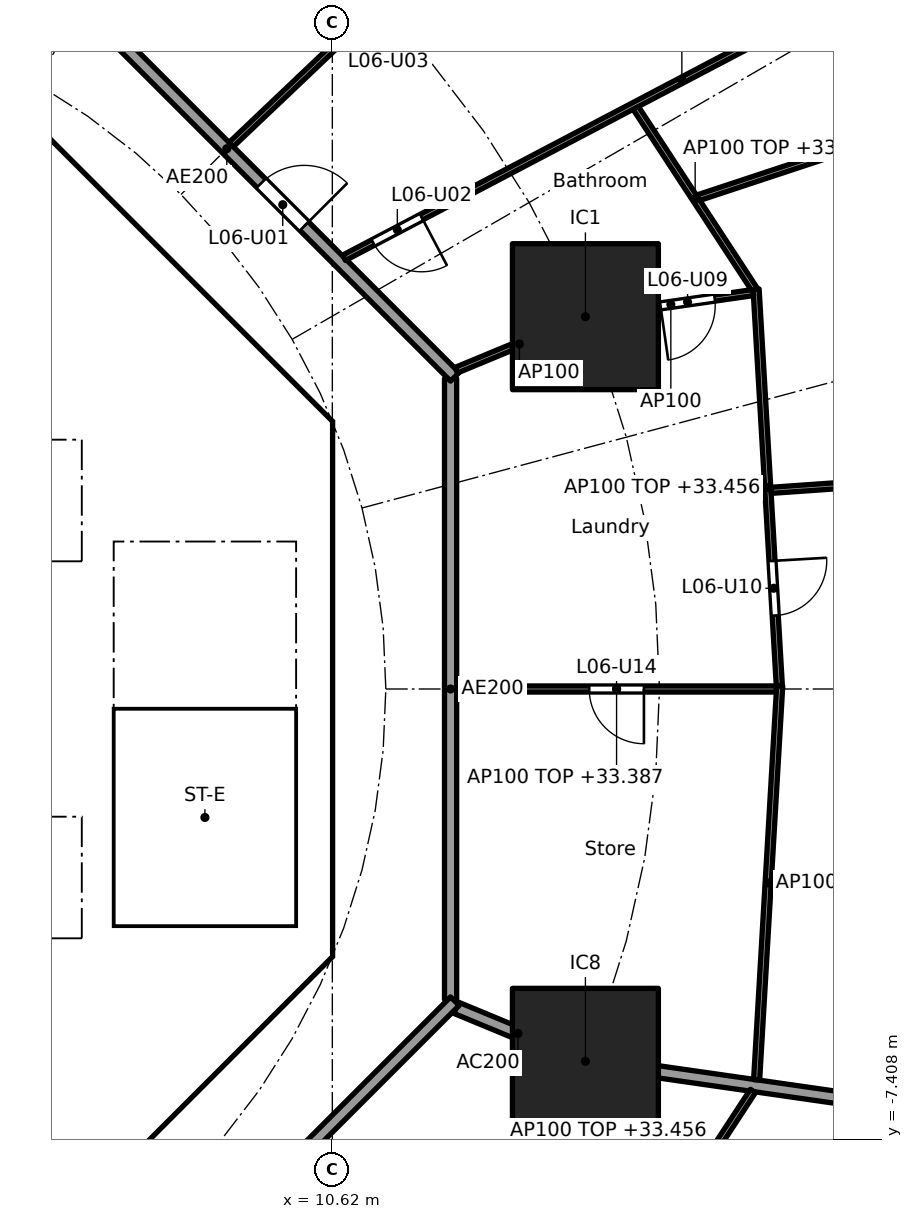
"""IFC4 building model, lengths in metres.
Left out: names, types, materials, properties, quantities, classifications, styles, units other than length and angle.
Written with IfcOpenShell. Run it as: python <this file> out.ifc"""

import sys

from ifc_helpers import new_model, si_unit, direction, frame, frame_2d, origin, origin_2d, place, context, subcontext, project, spatial, polyline, rectangle, outline, extrude, element, fill, save


model = new_model("IFC4")
c1 = context("Model", 3, precision=1e-05, world=origin(), true_north=direction((0.0, 1.0)))
c2 = subcontext(c1, "Body", "Model", "MODEL_VIEW")
j1 = project(units=[si_unit("LENGTHUNIT", "METRE"), si_unit("PLANEANGLEUNIT", "RADIAN")], contexts=[c1])
p1 = place(None, origin())
s1 = spatial("IfcSite", under=j1, at=p1, CompositionType="ELEMENT")
p2 = place(p1, origin())
s2 = spatial("IfcBuilding", under=s1, at=p2, CompositionType="ELEMENT")
p3 = place(p2, frame((0.0, 0.0, 30.7)))
s3 = spatial("IfcBuildingStorey", under=s2, at=p3, CompositionType="ELEMENT", Elevation=30.7)
for number, where, z_axis, x_axis in (
    (1, (14.782, 6.123, 0.0), (0.0, 0.0, 1.0), (1.0, 0.0, 0.0)),
    (2, (14.782, -6.123, 0.0), (0.0, 0.0, 1.0), (1.0, 0.0, 0.0)),
):
    element("IfcColumn", number, at=place(p3, frame(where, z_axis=z_axis, x_axis=x_axis)), inside=s3, PredefinedType="COLUMN", context=c2, shape_type="SweptSolid", body=[
        extrude(rectangle(XDim=2.4, YDim=2.4, at=origin_2d()), origin(), (0.0, 0.0, 1.0), 3.7),
    ])
p4 = place(p3, frame((9.988, 4.613, 0.0), z_axis=(0.0, 0.0, 1.0), x_axis=(-0.707106781187, 0.707106781187, 0.0)))
e3 = element("IfcWall", 3, at=p4, inside=s3, PredefinedType="SHEAR", context=c2, shape_type="SweptSolid", body=[
    extrude(rectangle(XDim=7.602, YDim=0.6, at=frame_2d((3.801, 0.0))), origin(), (0.0, 0.0, 1.0), 3.44),
])
p5 = place(p4, frame((3.201, 0.0, 0.0)))
e4 = element("IfcOpeningElement", 4, at=p5, cuts=e3, PredefinedType="OPENING", context=c2, shape_type="SweptSolid", body=[
    extrude(rectangle(XDim=1.2, YDim=2.1, at=frame_2d((0.6, 1.05))), frame((0.0, 0.31, 0.0), z_axis=(0.0, -1.0, 0.0), x_axis=(1.0, 0.0, 0.0)), (0.0, 0.0, 1.0), 0.62),
])
p6 = place(p3, frame((4.613, -9.988, 0.0), z_axis=(0.0, 0.0, 1.0), x_axis=(0.707106781187, 0.707106781187, 0.0)))
e5 = element("IfcWall", 5, at=p6, inside=s3, PredefinedType="SHEAR", context=c2, shape_type="SweptSolid", body=[
    extrude(rectangle(XDim=7.602, YDim=0.6, at=frame_2d((3.801, 0.0))), origin(), (0.0, 0.0, 1.0), 3.44),
])
p7 = place(p6, frame((3.201, 0.0, 0.0)))
e6 = element("IfcOpeningElement", 6, at=p7, cuts=e5, PredefinedType="OPENING", context=c2, shape_type="SweptSolid", body=[
    extrude(rectangle(XDim=1.2, YDim=2.1, at=frame_2d((0.6, 1.05))), frame((0.0, 0.31, 0.0), z_axis=(0.0, -1.0, 0.0), x_axis=(1.0, 0.0, 0.0)), (0.0, 0.0, 1.0), 0.62),
])
p8 = place(p3, frame((-6.7, 2.0, 0.0), z_axis=(0.0, 0.0, 1.0), x_axis=(1.0, 0.0, 0.0)))
e7 = element("IfcWall", 7, at=p8, inside=s3, PredefinedType="SOLIDWALL", context=c2, shape_type="SweptSolid", body=[
    extrude(rectangle(XDim=13.4, YDim=0.2, at=frame_2d((6.7, 0.0))), origin(), (0.0, 0.0, 1.0), 3.44),
])
p9 = place(p8, frame((0.65, 0.0, 0.0)))
e8 = element("IfcOpeningElement", 8, at=p9, cuts=e7, PredefinedType="OPENING", context=c2, shape_type="SweptSolid", body=[
    extrude(rectangle(XDim=1.1, YDim=2.1, at=frame_2d((0.55, 1.05))), frame((0.0, 0.11, 0.0), z_axis=(0.0, -1.0, 0.0), x_axis=(1.0, 0.0, 0.0)), (0.0, 0.0, 1.0), 0.22),
])
p10 = place(p8, frame((2.85, 0.0, 0.0)))
e9 = element("IfcOpeningElement", 9, at=p10, cuts=e7, PredefinedType="OPENING", context=c2, shape_type="SweptSolid", body=[
    extrude(rectangle(XDim=1.1, YDim=2.1, at=frame_2d((0.55, 1.05))), frame((0.0, 0.11, 0.0), z_axis=(0.0, -1.0, 0.0), x_axis=(1.0, 0.0, 0.0)), (0.0, 0.0, 1.0), 0.22),
])
p11 = place(p8, frame((5.05, 0.0, 0.0)))
e10 = element("IfcOpeningElement", 10, at=p11, cuts=e7, PredefinedType="OPENING", context=c2, shape_type="SweptSolid", body=[
    extrude(rectangle(XDim=1.1, YDim=2.1, at=frame_2d((0.55, 1.05))), frame((0.0, 0.11, 0.0), z_axis=(0.0, -1.0, 0.0), x_axis=(1.0, 0.0, 0.0)), (0.0, 0.0, 1.0), 0.22),
])
p12 = place(p3, frame((6.7, 4.0, 0.0), z_axis=(0.0, 0.0, 1.0), x_axis=(1.0, 0.0, 0.0)))
e11 = element("IfcWall", 11, at=p12, inside=s3, PredefinedType="SOLIDWALL", context=c2, shape_type="SweptSolid", body=[
    extrude(rectangle(XDim=3.325, YDim=0.2, at=frame_2d((1.662, 0.0))), origin(), (0.0, 0.0, 1.0), 3.44),
])
p13 = place(p12, frame((1.25, 0.0, 0.0)))
e12 = element("IfcOpeningElement", 12, at=p13, cuts=e11, PredefinedType="OPENING", context=c2, shape_type="SweptSolid", body=[
    extrude(rectangle(XDim=1.1, YDim=2.1, at=frame_2d((0.55, 1.05))), frame((0.0, 0.11, 0.0), z_axis=(0.0, -1.0, 0.0), x_axis=(1.0, 0.0, 0.0)), (0.0, 0.0, 1.0), 0.22),
])
p14 = place(p3, frame((-6.7, -2.0, 0.0), z_axis=(0.0, 0.0, 1.0), x_axis=(1.0, 0.0, 0.0)))
e13 = element("IfcWall", 13, at=p14, inside=s3, PredefinedType="SOLIDWALL", context=c2, shape_type="SweptSolid", body=[
    extrude(rectangle(XDim=13.4, YDim=0.2, at=frame_2d((6.7, 0.0))), origin(), (0.0, 0.0, 1.0), 3.44),
])
p15 = place(p14, frame((0.65, 0.0, 0.0)))
e14 = element("IfcOpeningElement", 14, at=p15, cuts=e13, PredefinedType="OPENING", context=c2, shape_type="SweptSolid", body=[
    extrude(rectangle(XDim=1.1, YDim=2.1, at=frame_2d((0.55, 1.05))), frame((0.0, 0.11, 0.0), z_axis=(0.0, -1.0, 0.0), x_axis=(1.0, 0.0, 0.0)), (0.0, 0.0, 1.0), 0.22),
])
p16 = place(p14, frame((2.85, 0.0, 0.0)))
e15 = element("IfcOpeningElement", 15, at=p16, cuts=e13, PredefinedType="OPENING", context=c2, shape_type="SweptSolid", body=[
    extrude(rectangle(XDim=1.1, YDim=2.1, at=frame_2d((0.55, 1.05))), frame((0.0, 0.11, 0.0), z_axis=(0.0, -1.0, 0.0), x_axis=(1.0, 0.0, 0.0)), (0.0, 0.0, 1.0), 0.22),
])
p17 = place(p3, origin())
e16 = element("IfcWall", 16, at=p17, inside=s3, PredefinedType="SHEAR", context=c2, shape_type="SweptSolid", body=[
    extrude(outline(polyline([(9.776, -4.401), (10.025, -4.152), (10.025, -3.801), (10.025, 4.152), (9.776, 4.401), (10.2, 4.825), (10.625, 4.401), (10.625, -4.401), (10.2, -4.825), (9.776, -4.401)])), origin(), (0.0, 0.0, 1.0), 3.44),
])
p18 = place(p3, origin())
e17 = element("IfcWall", 17, at=p18, inside=s3, PredefinedType="SOLIDWALL", context=c2, shape_type="SweptSolid", body=[
    extrude(outline(polyline([(-6.7, -2.1), (-6.5, -2.1), (-6.5, -4.1), (-4.5, -4.1), (-4.5, -2.1), (-4.3, -2.1), (-4.3, -4.1), (-2.3, -4.1), (-2.3, -2.1), (-2.1, -2.1), (-2.1, -4.1), (-0.1, -4.1), (-0.1, -2.1), (0.1, -2.1), (0.1, -4.1), (2.1, -4.1), (2.1, -2.1), (2.3, -2.1), (2.3, -4.1), (4.3, -4.1), (4.3, -2.1), (4.5, -2.1), (4.5, -4.1), (6.5, -4.1), (6.5, -2.1), (6.7, -2.1), (6.7, -4.3), (-6.7, -4.3), (-6.7, -2.1)])), origin(), (0.0, 0.0, 1.0), 3.44),
])
p19 = place(p3, origin())
e18 = element("IfcWall", 18, at=p19, inside=s3, PredefinedType="SOLIDWALL", context=c2, shape_type="SweptSolid", body=[
    extrude(outline(polyline([(-6.5, 2.1), (-6.7, 2.1), (-6.7, 4.3), (6.7, 4.3), (6.7, 2.1), (6.5, 2.1), (6.5, 4.1), (4.5, 4.1), (4.5, 2.1), (4.3, 2.1), (4.3, 4.1), (2.3, 4.1), (2.3, 2.1), (2.1, 2.1), (2.1, 4.1), (0.1, 4.1), (0.1, 2.1), (-0.1, 2.1), (-0.1, 4.1), (-2.1, 4.1), (-2.1, 2.1), (-2.3, 2.1), (-2.3, 4.1), (-4.3, 4.1), (-4.3, 2.1), (-4.5, 2.1), (-4.5, 4.1), (-6.5, 4.1), (-6.5, 2.1)])), origin(), (0.0, 0.0, 1.0), 3.44),
])
p20 = place(p3, origin())
e19 = element("IfcWall", 19, at=p20, inside=s3, PredefinedType="SOLIDWALL", context=c2, shape_type="SweptSolid", body=[
    extrude(outline(polyline([(7.025, -3.9), (6.7, -3.9), (6.7, 3.9), (7.025, 3.9), (7.025, -3.9)])), origin(), (0.0, 0.0, 1.0), 3.44),
])
p21 = place(p3, origin())
e20 = element("IfcWall", 20, at=p21, inside=s3, PredefinedType="SOLIDWALL", context=c2, shape_type="SweptSolid", body=[
    extrude(outline(polyline([(10.025, -4.1), (6.7, -4.1), (6.7, -3.9), (10.025, -3.9), (10.025, -4.1)])), origin(), (0.0, 0.0, 1.0), 3.44),
])
p22 = place(p3, frame((12.657, -5.243, 0.0), z_axis=(0.0, 0.0, 1.0), x_axis=(0.923853160736, -0.382747093259, 0.0)))
e21 = element("IfcWall", 21, at=p22, inside=s3, PredefinedType="PARTITIONING", context=c2, shape_type="SweptSolid", body=[
    extrude(rectangle(XDim=2.2, YDim=0.2, at=frame_2d((1.1, 0.0))), origin(), (0.0, 0.0, 1.0), 3.44),
])
p23 = place(p3, frame((14.832, -6.13, 0.0), z_axis=(0.0, 0.0, 1.0), x_axis=(0.989836541293, -0.142209779978, 0.0)))
e22 = element("IfcWall", 22, at=p23, inside=s3, PredefinedType="PARTITIONING", context=c2, shape_type="SweptSolid", body=[
    extrude(rectangle(XDim=15.909, YDim=0.2, at=frame_2d((7.955, 0.0))), origin(), (0.0, 0.0, 1.0), 2.756),
])
p24 = place(p3, frame((12.565, -5.104, 0.0), z_axis=(0.0, 0.0, 1.0), x_axis=(0.0, 1.0, 0.0)))
e23 = element("IfcWall", 23, at=p24, inside=s3, PredefinedType="PARTITIONING", context=c2, shape_type="SweptSolid", body=[
    extrude(rectangle(XDim=10.209, YDim=0.2, at=frame_2d((5.104, 0.0))), origin(), (0.0, 0.0, 1.0), 3.44),
])
p25 = place(p3, frame((12.635, 5.134, 0.0), z_axis=(0.0, 0.0, 1.0), x_axis=(-0.707106781187, 0.707106781187, 0.0)))
e24 = element("IfcWall", 24, at=p25, inside=s3, PredefinedType="PARTITIONING", context=c2, shape_type="SweptSolid", body=[
    extrude(rectangle(XDim=10.609, YDim=0.2, at=frame_2d((5.305, 0.0))), origin(), (0.0, 0.0, 1.0), 3.44),
])
p26 = place(p25, frame((3.503, 0.0, 0.0)))
e25 = element("IfcOpeningElement", 25, at=p26, cuts=e24, PredefinedType="OPENING", context=c2, shape_type="SweptSolid", body=[
    extrude(rectangle(XDim=1.0, YDim=2.1, at=frame_2d((0.5, 1.05))), frame((0.0, 0.11, 0.0), z_axis=(0.0, -1.0, 0.0), x_axis=(1.0, 0.0, 0.0)), (0.0, 0.0, 1.0), 0.22),
])
p27 = place(p3, frame((5.275, -12.494, 0.0), z_axis=(0.0, 0.0, 1.0), x_axis=(0.707106781187, 0.707106781187, 0.0)))
e26 = element("IfcWall", 26, at=p27, inside=s3, PredefinedType="PARTITIONING", context=c2, shape_type="SweptSolid", body=[
    extrude(rectangle(XDim=10.409, YDim=0.2, at=frame_2d((5.205, 0.0))), origin(), (0.0, 0.0, 1.0), 3.44),
])
p28 = place(p3, frame((12.665, 0.0, 0.0), z_axis=(0.0, 0.0, 1.0), x_axis=(1.0, 0.0, 0.0)))
e27 = element("IfcWall", 27, at=p28, inside=s3, PredefinedType="PARTITIONING", context=c2, shape_type="SweptSolid", body=[
    extrude(rectangle(XDim=5.26, YDim=0.1, at=frame_2d((2.63, 0.0))), origin(), (0.0, 0.0, 1.0), 2.687),
])
p29 = place(p28, frame((2.18, 0.0, 0.0)))
e28 = element("IfcOpeningElement", 28, at=p29, cuts=e27, PredefinedType="OPENING", context=c2, shape_type="SweptSolid", body=[
    extrude(rectangle(XDim=0.9, YDim=2.1, at=frame_2d((0.45, 1.05))), frame((0.0, 0.06, 0.0), z_axis=(0.0, -1.0, 0.0), x_axis=(1.0, 0.0, 0.0)), (0.0, 0.0, 1.0), 0.12),
])
p30 = place(p3, frame((17.971, 0.05, 0.0), z_axis=(0.0, 0.0, 1.0), x_axis=(-0.058476853647, 0.998288764631, 0.0)))
e29 = element("IfcWall", 29, at=p30, inside=s3, PredefinedType="PARTITIONING", context=c2, shape_type="SweptSolid", body=[
    extrude(rectangle(XDim=6.538, YDim=0.1, at=frame_2d((3.269, 0.0))), origin(), (0.0, 0.0, 1.0), 2.756),
])
p31 = place(p30, frame((1.159, 0.0, 0.0)))
e30 = element("IfcOpeningElement", 30, at=p31, cuts=e29, PredefinedType="OPENING", context=c2, shape_type="SweptSolid", body=[
    extrude(rectangle(XDim=0.9, YDim=2.1, at=frame_2d((0.45, 1.05))), frame((0.0, 0.06, 0.0), z_axis=(0.0, -1.0, 0.0), x_axis=(1.0, 0.0, 0.0)), (0.0, 0.0, 1.0), 0.12),
])
p32 = place(p3, frame((17.977, 0.05, 0.0), z_axis=(0.0, 0.0, 1.0), x_axis=(-0.058516864568, -0.998286420103, 0.0)))
e31 = element("IfcWall", 31, at=p32, inside=s3, PredefinedType="PARTITIONING", context=c2, shape_type="SweptSolid", body=[
    extrude(rectangle(XDim=6.488, YDim=0.1, at=frame_2d((3.244, 0.0))), origin(), (0.0, 0.0, 1.0), 2.756),
])
p33 = place(p3, frame((17.833, 3.267, 0.0), z_axis=(0.0, 0.0, 1.0), x_axis=(0.997537184513, 0.070139614438, 0.0)))
e32 = element("IfcWall", 32, at=p33, inside=s3, PredefinedType="PARTITIONING", context=c2, shape_type="SweptSolid", body=[
    extrude(rectangle(XDim=6.784, YDim=0.1, at=frame_2d((3.392, 0.0))), origin(), (0.0, 0.0, 1.0), 3.44),
])
p34 = place(p33, frame((2.942, 0.0, 0.0)))
e33 = element("IfcOpeningElement", 33, at=p34, cuts=e32, PredefinedType="OPENING", context=c2, shape_type="SweptSolid", body=[
    extrude(rectangle(XDim=0.9, YDim=2.1, at=frame_2d((0.45, 1.05))), frame((0.0, 0.06, 0.0), z_axis=(0.0, -1.0, 0.0), x_axis=(1.0, 0.0, 0.0)), (0.0, 0.0, 1.0), 0.12),
])
p35 = place(p3, frame((12.657, 5.243, 0.0), z_axis=(0.0, 0.0, 1.0), x_axis=(0.923864733477, 0.382719158442, 0.0)))
e34 = element("IfcWall", 34, at=p35, inside=s3, PredefinedType="PARTITIONING", context=c2, shape_type="SweptSolid", body=[
    extrude(rectangle(XDim=2.25, YDim=0.1, at=frame_2d((1.125, 0.0))), origin(), (0.0, 0.0, 1.0), 3.44),
])
p36 = place(p3, frame((14.832, 6.13, 0.0), z_axis=(0.0, 0.0, 1.0), x_axis=(0.989840446863, 0.142182593007, 0.0)))
e35 = element("IfcWall", 35, at=p36, inside=s3, PredefinedType="PARTITIONING", context=c2, shape_type="SweptSolid", body=[
    extrude(rectangle(XDim=2.739, YDim=0.1, at=frame_2d((1.369, 0.0))), origin(), (0.0, 0.0, 1.0), 3.44),
])
p37 = place(p36, frame((1.197, 0.0, 0.0)))
e36 = element("IfcOpeningElement", 36, at=p37, cuts=e35, PredefinedType="OPENING", context=c2, shape_type="SweptSolid", body=[
    extrude(rectangle(XDim=0.9, YDim=2.1, at=frame_2d((0.45, 1.05))), frame((0.0, 0.06, 0.0), z_axis=(0.0, -1.0, 0.0), x_axis=(1.0, 0.0, 0.0)), (0.0, 0.0, 1.0), 0.12),
])
p38 = place(p3, frame((17.564, 6.569, 0.0), z_axis=(0.0, 0.0, 1.0), x_axis=(-0.547641765292, 0.836712911881, 0.0)))
e37 = element("IfcWall", 37, at=p38, inside=s3, PredefinedType="PARTITIONING", context=c2, shape_type="SweptSolid", body=[
    extrude(rectangle(XDim=3.57, YDim=0.1, at=frame_2d((1.785, 0.0))), origin(), (0.0, 0.0, 1.0), 2.756),
])
p39 = place(p3, frame((16.635, 8.078, 0.0), z_axis=(0.0, 0.0, 1.0), x_axis=(0.949412285442, 0.314032342684, 0.0)))
e38 = element("IfcWall", 38, at=p39, inside=s3, PredefinedType="PARTITIONING", context=c2, shape_type="SweptSolid", body=[
    extrude(rectangle(XDim=14.451, YDim=0.1, at=frame_2d((7.226, 0.0))), origin(), (0.0, 0.0, 1.0), 2.837),
])
p40 = place(p3, frame((10.813, 7.091, 0.0), z_axis=(0.0, 0.0, 1.0), x_axis=(0.885182649479, 0.465243674928, 0.0)))
e39 = element("IfcWall", 39, at=p40, inside=s3, PredefinedType="PARTITIONING", context=c2, shape_type="SweptSolid", body=[
    extrude(rectangle(XDim=12.551, YDim=0.1, at=frame_2d((6.275, 0.0))), origin(), (0.0, 0.0, 1.0), 2.687),
])
p41 = place(p40, frame((0.539, 0.0, 0.0)))
e40 = element("IfcOpeningElement", 40, at=p41, cuts=e39, PredefinedType="OPENING", context=c2, shape_type="SweptSolid", body=[
    extrude(rectangle(XDim=0.9, YDim=2.1, at=frame_2d((0.45, 1.05))), frame((0.0, 0.06, 0.0), z_axis=(0.0, -1.0, 0.0), x_axis=(1.0, 0.0, 0.0)), (0.0, 0.0, 1.0), 0.12),
])
p42 = place(p40, frame((8.494, 0.0, 0.0)))
e41 = element("IfcOpeningElement", 41, at=p42, cuts=e39, PredefinedType="OPENING", context=c2, shape_type="SweptSolid", body=[
    extrude(rectangle(XDim=0.9, YDim=2.1, at=frame_2d((0.45, 1.05))), frame((0.0, 0.06, 0.0), z_axis=(0.0, -1.0, 0.0), x_axis=(1.0, 0.0, 0.0)), (0.0, 0.0, 1.0), 0.12),
])
p43 = place(p3, frame((8.957, 8.953, 0.0), z_axis=(0.0, 0.0, 1.0), x_axis=(0.725250022034, 0.688485588476, 0.0)))
e42 = element("IfcWall", 42, at=p43, inside=s3, PredefinedType="PARTITIONING", context=c2, shape_type="SweptSolid", body=[
    extrude(rectangle(XDim=12.963, YDim=0.1, at=frame_2d((6.481, 0.0))), origin(), (0.0, 0.0, 1.0), 2.687),
])
p44 = place(p43, frame((2.333, 0.0, 0.0)))
e43 = element("IfcOpeningElement", 43, at=p44, cuts=e42, PredefinedType="OPENING", context=c2, shape_type="SweptSolid", body=[
    extrude(rectangle(XDim=0.9, YDim=2.1, at=frame_2d((0.45, 1.05))), frame((0.0, 0.06, 0.0), z_axis=(0.0, -1.0, 0.0), x_axis=(1.0, 0.0, 0.0)), (0.0, 0.0, 1.0), 0.12),
])
p45 = place(p43, frame((8.79, 0.0, 0.0)))
e44 = element("IfcOpeningElement", 44, at=p45, cuts=e42, PredefinedType="OPENING", context=c2, shape_type="SweptSolid", body=[
    extrude(rectangle(XDim=0.9, YDim=2.1, at=frame_2d((0.45, 1.05))), frame((0.0, 0.06, 0.0), z_axis=(0.0, -1.0, 0.0), x_axis=(1.0, 0.0, 0.0)), (0.0, 0.0, 1.0), 0.12),
])
p46 = place(p3, frame((15.609, -9.556, 0.0), z_axis=(0.0, 0.0, 1.0), x_axis=(0.547637987196, 0.836715384692, 0.0)))
e45 = element("IfcWall", 45, at=p46, inside=s3, PredefinedType="PARTITIONING", context=c2, shape_type="SweptSolid", body=[
    extrude(rectangle(XDim=3.52, YDim=0.1, at=frame_2d((1.76, 0.0))), origin(), (0.0, 0.0, 1.0), 2.756),
])
p47 = place(p13, frame((1.1, 0.0, 0.0), x_axis=(-1.0, 0.0, 0.0)))
e46 = element("IfcDoor", 46, at=p47, inside=s3, OperationType="SINGLE_SWING_LEFT", PredefinedType="DOOR", context=c2, shape_type="SweptSolid", body=[
    extrude(rectangle(XDim=1.1, YDim=2.1, at=frame_2d((0.55, 1.05))), frame((0.0, 0.025, 0.0), z_axis=(0.0, -1.0, 0.0), x_axis=(1.0, 0.0, 0.0)), (0.0, 0.0, 1.0), 0.05),
])
fill(e12, e46)
p48 = place(p5, origin())
e47 = element("IfcDoor", 47, at=p48, inside=s3, OperationType="SINGLE_SWING_RIGHT", PredefinedType="DOOR", context=c2, shape_type="SweptSolid", body=[
    extrude(rectangle(XDim=1.2, YDim=2.1, at=frame_2d((0.6, 1.05))), frame((0.0, 0.025, 0.0), z_axis=(0.0, -1.0, 0.0), x_axis=(1.0, 0.0, 0.0)), (0.0, 0.0, 1.0), 0.05),
])
fill(e4, e47)
p49 = place(p7, origin())
e48 = element("IfcDoor", 48, at=p49, inside=s3, OperationType="SINGLE_SWING_RIGHT", PredefinedType="DOOR", context=c2, shape_type="SweptSolid", body=[
    extrude(rectangle(XDim=1.2, YDim=2.1, at=frame_2d((0.6, 1.05))), frame((0.0, 0.025, 0.0), z_axis=(0.0, -1.0, 0.0), x_axis=(1.0, 0.0, 0.0)), (0.0, 0.0, 1.0), 0.05),
])
fill(e6, e48)
p50 = place(p26, frame((1.0, 0.0, 0.0), x_axis=(-1.0, 0.0, 0.0)))
e49 = element("IfcDoor", 49, at=p50, inside=s3, OperationType="SINGLE_SWING_RIGHT", PredefinedType="DOOR", context=c2, shape_type="SweptSolid", body=[
    extrude(rectangle(XDim=1.0, YDim=2.1, at=frame_2d((0.5, 1.05))), frame((0.0, 0.025, 0.0), z_axis=(0.0, -1.0, 0.0), x_axis=(1.0, 0.0, 0.0)), (0.0, 0.0, 1.0), 0.05),
])
fill(e25, e49)
p51 = place(p41, frame((0.9, 0.0, 0.0), x_axis=(-1.0, 0.0, 0.0)))
e50 = element("IfcDoor", 50, at=p51, inside=s3, OperationType="SINGLE_SWING_LEFT", PredefinedType="DOOR", context=c2, shape_type="SweptSolid", body=[
    extrude(rectangle(XDim=0.9, YDim=2.1, at=frame_2d((0.45, 1.05))), frame((0.0, 0.025, 0.0), z_axis=(0.0, -1.0, 0.0), x_axis=(1.0, 0.0, 0.0)), (0.0, 0.0, 1.0), 0.05),
])
fill(e40, e50)
p52 = place(p37, frame((0.9, 0.0, 0.0), x_axis=(-1.0, 0.0, 0.0)))
e51 = element("IfcDoor", 51, at=p52, inside=s3, OperationType="SINGLE_SWING_RIGHT", PredefinedType="DOOR", context=c2, shape_type="SweptSolid", body=[
    extrude(rectangle(XDim=0.9, YDim=2.1, at=frame_2d((0.45, 1.05))), frame((0.0, 0.025, 0.0), z_axis=(0.0, -1.0, 0.0), x_axis=(1.0, 0.0, 0.0)), (0.0, 0.0, 1.0), 0.05),
])
fill(e36, e51)
p53 = place(p31, frame((0.9, 0.0, 0.0), x_axis=(-1.0, 0.0, 0.0)))
e52 = element("IfcDoor", 52, at=p53, inside=s3, OperationType="SINGLE_SWING_LEFT", PredefinedType="DOOR", context=c2, shape_type="SweptSolid", body=[
    extrude(rectangle(XDim=0.9, YDim=2.1, at=frame_2d((0.45, 1.05))), frame((0.0, 0.025, 0.0), z_axis=(0.0, -1.0, 0.0), x_axis=(1.0, 0.0, 0.0)), (0.0, 0.0, 1.0), 0.05),
])
fill(e30, e52)
p54 = place(p29, frame((0.9, 0.0, 0.0), x_axis=(-1.0, 0.0, 0.0)))
e53 = element("IfcDoor", 53, at=p54, inside=s3, OperationType="SINGLE_SWING_LEFT", PredefinedType="DOOR", context=c2, shape_type="SweptSolid", body=[
    extrude(rectangle(XDim=0.9, YDim=2.1, at=frame_2d((0.45, 1.05))), frame((0.0, 0.025, 0.0), z_axis=(0.0, -1.0, 0.0), x_axis=(1.0, 0.0, 0.0)), (0.0, 0.0, 1.0), 0.05),
])
fill(e28, e53)
save(model, sys.argv[1])
